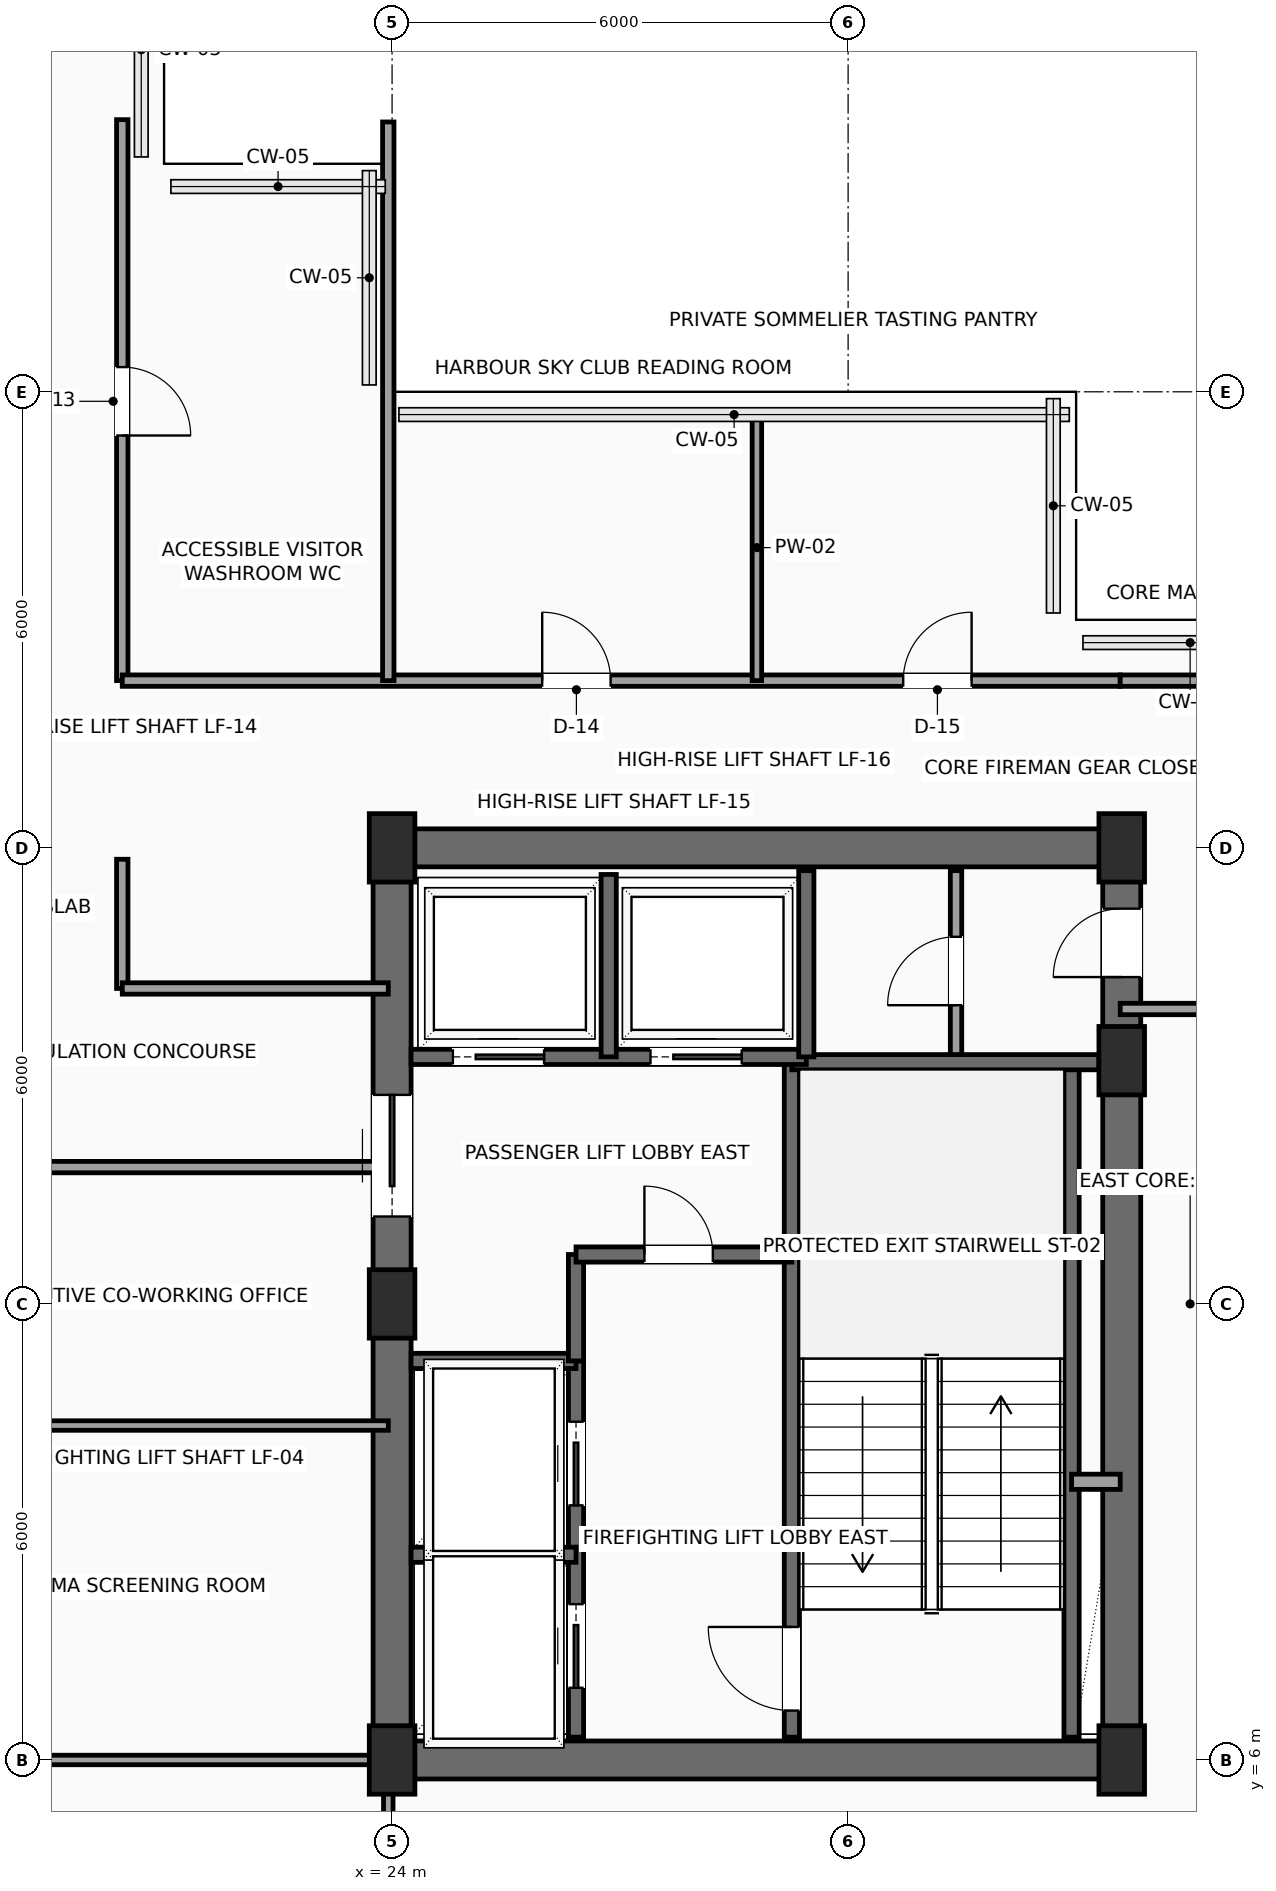
"""IFC4 building model, lengths in metres.
Left out: names, types, materials, properties, quantities, classifications, styles, units other than length and angle.
Written with IfcOpenShell. Run it as: python <this file> out.ifc"""

import sys

from ifc_helpers import new_model, si_unit, direction, frame, frame_2d, origin, origin_2d, place, context, subcontext, project, spatial, rectangle, extrude, element, fill, save


model = new_model("IFC4")
c1 = context("Model", 3, precision=1e-05, world=origin(), true_north=direction((0.0, 1.0)))
c2 = subcontext(c1, "Body", "Model", "MODEL_VIEW")
j1 = project(units=[si_unit("LENGTHUNIT", "METRE"), si_unit("PLANEANGLEUNIT", "RADIAN")], contexts=[c1])
p1 = place(None, origin())
s1 = spatial("IfcSite", under=j1, at=p1, CompositionType="ELEMENT")
p2 = place(p1, origin())
s2 = spatial("IfcBuilding", under=s1, at=p2, CompositionType="ELEMENT")
p3 = place(p2, frame((0.0, 0.0, 267.7)))
s3 = spatial("IfcBuildingStorey", under=s2, at=p3, CompositionType="ELEMENT", Elevation=267.7)
for number, where, z_axis, x_axis in (
    (1, (24.0, 6.0, 0.0), (0.0, 0.0, 1.0), (1.0, 0.0, 0.0)),
    (2, (24.0, 12.0, 0.0), (0.0, 0.0, 1.0), (1.0, 0.0, 0.0)),
    (3, (24.0, 18.0, 0.0), (0.0, 0.0, 1.0), (1.0, 0.0, 0.0)),
    (4, (33.6, 6.0, 0.0), (0.0, 0.0, 1.0), (1.0, 0.0, 0.0)),
    (5, (33.6, 15.2, 0.0), (0.0, 0.0, 1.0), (1.0, 0.0, 0.0)),
    (6, (33.6, 18.0, 0.0), (0.0, 0.0, 1.0), (1.0, 0.0, 0.0)),
):
    element("IfcColumn", number, at=place(p3, frame(where, z_axis=z_axis, x_axis=x_axis)), inside=s3, PredefinedType="COLUMN", context=c2, shape_type="SweptSolid", body=[
        extrude(rectangle(XDim=0.6, YDim=0.9, at=origin_2d()), origin(), (0.0, 0.0, 1.0), 3.5),
    ])
for number, where, z_axis, x_axis in (
    (7, (24.0, 6.0, 0.0), (0.0, 0.0, 1.0), (1.0, 0.0, 0.0)),
    (8, (24.0, 18.0, 0.0), (0.0, 0.0, 1.0), (1.0, 0.0, 0.0)),
):
    element("IfcWall", number, at=place(p3, frame(where, z_axis=z_axis, x_axis=x_axis)), inside=s3, PredefinedType="SHEAR", context=c2, shape_type="SweptSolid", body=[
        extrude(rectangle(XDim=9.6, YDim=0.5, at=frame_2d((4.8, 0.0))), origin(), (0.0, 0.0, 1.0), 3.3),
    ])
p4 = place(p3, frame((24.0, 6.0, 0.0), z_axis=(0.0, 0.0, 1.0), x_axis=(0.0, 1.0, 0.0)))
e9 = element("IfcWall", 9, at=p4, inside=s3, PredefinedType="SHEAR", context=c2, shape_type="SweptSolid", body=[
    extrude(rectangle(XDim=12.0, YDim=0.5, at=frame_2d((6.0, 0.0))), origin(), (0.0, 0.0, 1.0), 3.3),
])
p5 = place(p4, frame((7.15, 0.0, 0.0)))
e10 = element("IfcOpeningElement", 10, at=p5, cuts=e9, PredefinedType="OPENING", context=c2, shape_type="SweptSolid", body=[
    extrude(rectangle(XDim=1.6, YDim=2.3, at=frame_2d((0.8, 1.15))), frame((0.0, 0.26, 0.0), z_axis=(0.0, -1.0, 0.0), x_axis=(1.0, 0.0, 0.0)), (0.0, 0.0, 1.0), 0.52),
])
p6 = place(p3, frame((33.6, 6.0, 0.0), z_axis=(0.0, 0.0, 1.0), x_axis=(0.0, 1.0, 0.0)))
e11 = element("IfcWall", 11, at=p6, inside=s3, PredefinedType="SHEAR", context=c2, shape_type="SweptSolid", body=[
    extrude(rectangle(XDim=12.0, YDim=0.5, at=frame_2d((6.0, 0.0))), origin(), (0.0, 0.0, 1.0), 3.3),
])
p7 = place(p6, frame((10.3, 0.0, 0.0)))
e12 = element("IfcOpeningElement", 12, at=p7, cuts=e11, PredefinedType="OPENING", context=c2, shape_type="SweptSolid", body=[
    extrude(rectangle(XDim=0.9, YDim=2.15, at=frame_2d((0.45, 1.075))), frame((0.0, 0.26, 0.0), z_axis=(0.0, -1.0, 0.0), x_axis=(1.0, 0.0, 0.0)), (0.0, 0.0, 1.0), 0.52),
])
p8 = place(p3, frame((29.26, 6.3, 0.0), z_axis=(0.0, 0.0, 1.0), x_axis=(0.0, 1.0, 0.0)))
e13 = element("IfcWall", 13, at=p8, inside=s3, PredefinedType="SHEAR", context=c2, shape_type="SweptSolid", body=[
    extrude(rectangle(XDim=8.88, YDim=0.2, at=frame_2d((4.44, 0.0))), origin(), (0.0, 0.0, 1.0), 3.3),
])
p9 = place(p8, frame((0.35, 0.0, 0.0)))
e14 = element("IfcOpeningElement", 14, at=p9, cuts=e13, PredefinedType="OPENING", context=c2, shape_type="SweptSolid", body=[
    extrude(rectangle(XDim=1.1, YDim=2.2, at=frame_2d((0.55, 1.1))), frame((0.0, 0.11, 0.0), z_axis=(0.0, -1.0, 0.0), x_axis=(1.0, 0.0, 0.0)), (0.0, 0.0, 1.0), 0.22),
])
p10 = place(p3, frame((32.94, 6.3, 0.0), z_axis=(0.0, 0.0, 1.0), x_axis=(0.0, 1.0, 0.0)))
e15 = element("IfcWall", 15, at=p10, inside=s3, PredefinedType="SHEAR", context=c2, shape_type="SweptSolid", body=[
    extrude(rectangle(XDim=8.88, YDim=0.2, at=frame_2d((4.44, 0.0))), origin(), (0.0, 0.0, 1.0), 3.3),
])
p11 = place(p3, frame((29.26, 15.18, 0.0), z_axis=(0.0, 0.0, 1.0), x_axis=(1.0, 0.0, 0.0)))
e16 = element("IfcWall", 16, at=p11, inside=s3, PredefinedType="SHEAR", context=c2, shape_type="SweptSolid", body=[
    extrude(rectangle(XDim=4.04, YDim=0.2, at=frame_2d((2.02, 0.0))), origin(), (0.0, 0.0, 1.0), 3.3),
])
p12 = place(p3, frame((26.42, 6.3, 0.0), z_axis=(0.0, 0.0, 1.0), x_axis=(0.0, 1.0, 0.0)))
e17 = element("IfcWall", 17, at=p12, inside=s3, PredefinedType="SHEAR", context=c2, shape_type="SweptSolid", body=[
    extrude(rectangle(XDim=4.95, YDim=0.2, at=frame_2d((2.475, 0.0))), origin(), (0.0, 0.0, 1.0), 3.3),
])
p13 = place(p12, frame((0.65, 0.0, 0.0)))
e18 = element("IfcOpeningElement", 18, at=p13, cuts=e17, PredefinedType="OPENING", context=c2, shape_type="SweptSolid", body=[
    extrude(rectangle(XDim=1.1, YDim=2.2, at=frame_2d((0.55, 1.1))), frame((0.0, 0.11, 0.0), z_axis=(0.0, -1.0, 0.0), x_axis=(1.0, 0.0, 0.0)), (0.0, 0.0, 1.0), 0.22),
])
p14 = place(p12, frame((3.05, 0.0, 0.0)))
e19 = element("IfcOpeningElement", 19, at=p14, cuts=e17, PredefinedType="OPENING", context=c2, shape_type="SweptSolid", body=[
    extrude(rectangle(XDim=1.1, YDim=2.2, at=frame_2d((0.55, 1.1))), frame((0.0, 0.11, 0.0), z_axis=(0.0, -1.0, 0.0), x_axis=(1.0, 0.0, 0.0)), (0.0, 0.0, 1.0), 0.22),
])
for number, where, z_axis, x_axis in (
    (20, (24.25, 8.7, 0.0), (0.0, 0.0, 1.0), (1.0, 0.0, 0.0)),
    (21, (24.25, 11.25, 0.0), (0.0, 0.0, 1.0), (1.0, 0.0, 0.0)),
):
    element("IfcWall", number, at=place(p3, frame(where, z_axis=z_axis, x_axis=x_axis)), inside=s3, PredefinedType="SHEAR", context=c2, shape_type="SweptSolid", body=[
        extrude(rectangle(XDim=2.17, YDim=0.2, at=frame_2d((1.085, 0.0))), origin(), (0.0, 0.0, 1.0), 3.3),
    ])
p15 = place(p3, frame((26.42, 11.25, 0.0), z_axis=(0.0, 0.0, 1.0), x_axis=(0.0, 1.0, 0.0)))
e22 = element("IfcWall", 22, at=p15, inside=s3, PredefinedType="SHEAR", context=c2, shape_type="SweptSolid", body=[
    extrude(rectangle(XDim=1.4, YDim=0.2, at=frame_2d((0.7, 0.0))), origin(), (0.0, 0.0, 1.0), 3.3),
])
p16 = place(p3, frame((26.42, 12.65, 0.0), z_axis=(0.0, 0.0, 1.0), x_axis=(1.0, 0.0, 0.0)))
e23 = element("IfcWall", 23, at=p16, inside=s3, PredefinedType="SHEAR", context=c2, shape_type="SweptSolid", body=[
    extrude(rectangle(XDim=2.84, YDim=0.2, at=frame_2d((1.42, 0.0))), origin(), (0.0, 0.0, 1.0), 3.3),
])
p17 = place(p16, frame((0.9, 0.0, 0.0)))
e24 = element("IfcOpeningElement", 24, at=p17, cuts=e23, PredefinedType="OPENING", context=c2, shape_type="SweptSolid", body=[
    extrude(rectangle(XDim=0.9, YDim=2.15, at=frame_2d((0.45, 1.075))), frame((0.0, 0.11, 0.0), z_axis=(0.0, -1.0, 0.0), x_axis=(1.0, 0.0, 0.0)), (0.0, 0.0, 1.0), 0.22),
])
p18 = place(p3, frame((32.94, 9.66, 0.0), z_axis=(0.0, 0.0, 1.0), x_axis=(1.0, 0.0, 0.0)))
e25 = element("IfcWall", 25, at=p18, inside=s3, PredefinedType="SOLIDWALL", context=c2, shape_type="SweptSolid", body=[
    extrude(rectangle(XDim=0.64, YDim=0.2, at=frame_2d((0.32, 0.0))), origin(), (0.0, 0.0, 1.0), 3.3),
])
p19 = place(p3, frame((24.25, 15.25, 0.0), z_axis=(0.0, 0.0, 1.0), x_axis=(1.0, 0.0, 0.0)))
e26 = element("IfcWall", 26, at=p19, inside=s3, PredefinedType="SHEAR", context=c2, shape_type="SweptSolid", body=[
    extrude(rectangle(XDim=5.2, YDim=0.2, at=frame_2d((2.6, 0.0))), origin(), (0.0, 0.0, 1.0), 3.3),
])
p20 = place(p19, frame((0.55, 0.0, 0.0)))
e27 = element("IfcOpeningElement", 27, at=p20, cuts=e26, PredefinedType="OPENING", context=c2, shape_type="SweptSolid", body=[
    extrude(rectangle(XDim=1.2, YDim=2.2, at=frame_2d((0.6, 1.1))), frame((0.0, 0.11, 0.0), z_axis=(0.0, -1.0, 0.0), x_axis=(1.0, 0.0, 0.0)), (0.0, 0.0, 1.0), 0.22),
])
p21 = place(p19, frame((3.15, 0.0, 0.0)))
e28 = element("IfcOpeningElement", 28, at=p21, cuts=e26, PredefinedType="OPENING", context=c2, shape_type="SweptSolid", body=[
    extrude(rectangle(XDim=1.2, YDim=2.2, at=frame_2d((0.6, 1.1))), frame((0.0, 0.11, 0.0), z_axis=(0.0, -1.0, 0.0), x_axis=(1.0, 0.0, 0.0)), (0.0, 0.0, 1.0), 0.22),
])
p22 = place(p3, frame((26.85, 15.25, 0.0), z_axis=(0.0, 0.0, 1.0), x_axis=(0.0, 1.0, 0.0)))
e29 = element("IfcWall", 29, at=p22, inside=s3, PredefinedType="SHEAR", context=c2, shape_type="SweptSolid", body=[
    extrude(rectangle(XDim=2.4, YDim=0.2, at=frame_2d((1.2, 0.0))), origin(), (0.0, 0.0, 1.0), 3.3),
])
p23 = place(p3, frame((29.45, 15.25, 0.0), z_axis=(0.0, 0.0, 1.0), x_axis=(0.0, 1.0, 0.0)))
e30 = element("IfcWall", 30, at=p23, inside=s3, PredefinedType="SHEAR", context=c2, shape_type="SweptSolid", body=[
    extrude(rectangle(XDim=2.45, YDim=0.2, at=frame_2d((1.225, 0.0))), origin(), (0.0, 0.0, 1.0), 3.3),
])
p24 = place(p3, frame((31.42, 15.28, 0.0), z_axis=(0.0, 0.0, 1.0), x_axis=(0.0, 1.0, 0.0)))
e31 = element("IfcWall", 31, at=p24, inside=s3, PredefinedType="PARTITIONING", context=c2, shape_type="SweptSolid", body=[
    extrude(rectangle(XDim=2.42, YDim=0.15, at=frame_2d((1.21, 0.0))), origin(), (0.0, 0.0, 1.0), 3.3),
])
p25 = place(p24, frame((0.65, 0.0, 0.0)))
e32 = element("IfcOpeningElement", 32, at=p25, cuts=e31, PredefinedType="OPENING", context=c2, shape_type="SweptSolid", body=[
    extrude(rectangle(XDim=0.9, YDim=2.15, at=frame_2d((0.45, 1.075))), frame((0.0, 0.085, 0.0), z_axis=(0.0, -1.0, 0.0), x_axis=(1.0, 0.0, 0.0)), (0.0, 0.0, 1.0), 0.17),
])
p26 = place(p3, frame((20.45, 27.58, 0.0), z_axis=(0.0, 0.0, 1.0), x_axis=(0.0, -1.0, 0.0)))
e33 = element("IfcWall", 33, at=p26, inside=s3, PredefinedType="PARTITIONING", context=c2, shape_type="SweptSolid", body=[
    extrude(rectangle(XDim=7.38, YDim=0.15, at=frame_2d((3.69, 0.0))), origin(), (0.0, 0.0, 1.0), 3.3),
])
p27 = place(p26, frame((3.255, 0.0, 0.0)))
e34 = element("IfcOpeningElement", 34, at=p27, cuts=e33, PredefinedType="OPENING", context=c2, shape_type="SweptSolid", body=[
    extrude(rectangle(XDim=0.9, YDim=2.1, at=frame_2d((0.45, 1.05))), frame((0.0, 0.085, 0.0), z_axis=(0.0, -1.0, 0.0), x_axis=(1.0, 0.0, 0.0)), (0.0, 0.0, 1.0), 0.17),
])
p28 = place(p3, frame((20.45, 20.2, 0.0), z_axis=(0.0, 0.0, 1.0), x_axis=(1.0, 0.0, 0.0)))
e35 = element("IfcWall", 35, at=p28, inside=s3, PredefinedType="PARTITIONING", context=c2, shape_type="SweptSolid", body=[
    extrude(rectangle(XDim=13.13, YDim=0.15, at=frame_2d((6.565, 0.0))), origin(), (0.0, 0.0, 1.0), 3.3),
])
p29 = place(p28, frame((5.525, 0.0, 0.0)))
e36 = element("IfcOpeningElement", 36, at=p29, cuts=e35, PredefinedType="OPENING", context=c2, shape_type="SweptSolid", body=[
    extrude(rectangle(XDim=0.9, YDim=2.1, at=frame_2d((0.45, 1.05))), frame((0.0, 0.085, 0.0), z_axis=(0.0, -1.0, 0.0), x_axis=(1.0, 0.0, 0.0)), (0.0, 0.0, 1.0), 0.17),
])
p30 = place(p28, frame((10.275, 0.0, 0.0)))
e37 = element("IfcOpeningElement", 37, at=p30, cuts=e35, PredefinedType="OPENING", context=c2, shape_type="SweptSolid", body=[
    extrude(rectangle(XDim=0.9, YDim=2.1, at=frame_2d((0.45, 1.05))), frame((0.0, 0.085, 0.0), z_axis=(0.0, -1.0, 0.0), x_axis=(1.0, 0.0, 0.0)), (0.0, 0.0, 1.0), 0.17),
])
for number, where, z_axis, x_axis in (
    (38, (33.58, 20.2, 0.0), (0.0, 0.0, 1.0), (1.0, 0.0, 0.0)),
    (39, (35.7, 15.88, 0.0), (0.0, 0.0, 1.0), (-1.0, 0.0, 0.0)),
):
    element("IfcWall", number, at=place(p3, frame(where, z_axis=z_axis, x_axis=x_axis)), inside=s3, PredefinedType="PARTITIONING", context=c2, shape_type="SweptSolid", body=[
        extrude(rectangle(XDim=2.12, YDim=0.15, at=frame_2d((1.06, 0.0))), origin(), (0.0, 0.0, 1.0), 3.3),
    ])
p31 = place(p3, frame((20.45, 17.85, 0.0), z_axis=(0.0, 0.0, 1.0), x_axis=(0.0, -1.0, 0.0)))
e40 = element("IfcWall", 40, at=p31, inside=s3, PredefinedType="PARTITIONING", context=c2, shape_type="SweptSolid", body=[
    extrude(rectangle(XDim=1.7, YDim=0.15, at=frame_2d((0.85, 0.0))), origin(), (0.0, 0.0, 1.0), 3.3),
])
p32 = place(p3, frame((20.45, 16.15, 0.0), z_axis=(0.0, 0.0, 1.0), x_axis=(1.0, 0.0, 0.0)))
e41 = element("IfcWall", 41, at=p32, inside=s3, PredefinedType="PARTITIONING", context=c2, shape_type="SweptSolid", body=[
    extrude(rectangle(XDim=3.5, YDim=0.15, at=frame_2d((1.75, 0.0))), origin(), (0.0, 0.0, 1.0), 3.3),
])
p33 = place(p3, frame((23.95, 13.8, 0.0), z_axis=(0.0, 0.0, 1.0), x_axis=(-1.0, 0.0, 0.0)))
e42 = element("IfcWall", 42, at=p33, inside=s3, PredefinedType="PARTITIONING", context=c2, shape_type="SweptSolid", body=[
    extrude(rectangle(XDim=9.0, YDim=0.15, at=frame_2d((4.5, 0.0))), origin(), (0.0, 0.0, 1.0), 3.3),
])
p34 = place(p3, frame((23.95, 20.2, 0.0), z_axis=(0.0, 0.0, 1.0), x_axis=(0.0, 1.0, 0.0)))
e43 = element("IfcWall", 43, at=p34, inside=s3, PredefinedType="PARTITIONING", context=c2, shape_type="SweptSolid", body=[
    extrude(rectangle(XDim=7.35, YDim=0.15, at=frame_2d((3.675, 0.0))), origin(), (0.0, 0.0, 1.0), 3.3),
])
p35 = place(p3, frame((28.8, 20.2, 0.0), z_axis=(0.0, 0.0, 1.0), x_axis=(0.0, 1.0, 0.0)))
e44 = element("IfcWall", 44, at=p35, inside=s3, PredefinedType="PARTITIONING", context=c2, shape_type="SweptSolid", body=[
    extrude(rectangle(XDim=3.5, YDim=0.125, at=frame_2d((1.75, 0.0))), origin(), (0.0, 0.0, 1.0), 3.3),
])
p36 = place(p3, frame((14.95, 6.0, 0.0), z_axis=(0.0, 0.0, 1.0), x_axis=(1.0, 0.0, 0.0)))
e45 = element("IfcWall", 45, at=p36, inside=s3, PredefinedType="PARTITIONING", context=c2, shape_type="SweptSolid", body=[
    extrude(rectangle(XDim=9.0, YDim=0.125, at=frame_2d((4.5, 0.0))), origin(), (0.0, 0.0, 1.0), 2.992),
])
p37 = place(p3, frame((23.95, 0.3, 0.0), z_axis=(0.0, 0.0, 1.0), x_axis=(0.0, 1.0, 0.0)))
e46 = element("IfcWall", 46, at=p37, inside=s3, PredefinedType="PARTITIONING", context=c2, shape_type="SweptSolid", body=[
    extrude(rectangle(XDim=5.7, YDim=0.125, at=frame_2d((2.85, 0.0))), origin(), (0.0, 0.0, 1.0), 2.967),
])
p38 = place(p3, frame((14.95, 10.4, 0.0), z_axis=(0.0, 0.0, 1.0), x_axis=(1.0, 0.0, 0.0)))
e47 = element("IfcWall", 47, at=p38, inside=s3, PredefinedType="PARTITIONING", context=c2, shape_type="SweptSolid", body=[
    extrude(rectangle(XDim=9.0, YDim=0.125, at=frame_2d((4.5, 0.0))), origin(), (0.0, 0.0, 1.0), 3.3),
])
p39 = place(p5, origin())
e48 = element("IfcDoor", 48, at=p39, inside=s3, OperationType="DOUBLE_DOOR_SLIDING", PredefinedType="DOOR", context=c2, shape_type="SweptSolid", body=[
    extrude(rectangle(XDim=1.6, YDim=2.3, at=frame_2d((0.8, 1.15))), frame((0.0, 0.025, 0.0), z_axis=(0.0, -1.0, 0.0), x_axis=(1.0, 0.0, 0.0)), (0.0, 0.0, 1.0), 0.05),
])
fill(e10, e48)
p40 = place(p7, origin())
e49 = element("IfcDoor", 49, at=p40, inside=s3, OperationType="SINGLE_SWING_LEFT", PredefinedType="DOOR", context=c2, shape_type="SweptSolid", body=[
    extrude(rectangle(XDim=0.9, YDim=2.15, at=frame_2d((0.45, 1.075))), frame((0.0, 0.025, 0.0), z_axis=(0.0, -1.0, 0.0), x_axis=(1.0, 0.0, 0.0)), (0.0, 0.0, 1.0), 0.05),
])
fill(e12, e49)
p41 = place(p9, origin())
e50 = element("IfcDoor", 50, at=p41, inside=s3, OperationType="SINGLE_SWING_RIGHT", PredefinedType="DOOR", context=c2, shape_type="SweptSolid", body=[
    extrude(rectangle(XDim=1.1, YDim=2.2, at=frame_2d((0.55, 1.1))), frame((0.0, 0.025, 0.0), z_axis=(0.0, -1.0, 0.0), x_axis=(1.0, 0.0, 0.0)), (0.0, 0.0, 1.0), 0.05),
])
fill(e14, e50)
p42 = place(p13, origin())
e51 = element("IfcDoor", 51, at=p42, inside=s3, OperationType="SLIDING_TO_LEFT", PredefinedType="DOOR", context=c2, shape_type="SweptSolid", body=[
    extrude(rectangle(XDim=1.1, YDim=2.2, at=frame_2d((0.55, 1.1))), frame((0.0, 0.025, 0.0), z_axis=(0.0, -1.0, 0.0), x_axis=(1.0, 0.0, 0.0)), (0.0, 0.0, 1.0), 0.05),
])
fill(e18, e51)
p43 = place(p14, origin())
e52 = element("IfcDoor", 52, at=p43, inside=s3, OperationType="SLIDING_TO_LEFT", PredefinedType="DOOR", context=c2, shape_type="SweptSolid", body=[
    extrude(rectangle(XDim=1.1, YDim=2.2, at=frame_2d((0.55, 1.1))), frame((0.0, 0.025, 0.0), z_axis=(0.0, -1.0, 0.0), x_axis=(1.0, 0.0, 0.0)), (0.0, 0.0, 1.0), 0.05),
])
fill(e19, e52)
p44 = place(p17, origin())
e53 = element("IfcDoor", 53, at=p44, inside=s3, OperationType="SINGLE_SWING_LEFT", PredefinedType="DOOR", context=c2, shape_type="SweptSolid", body=[
    extrude(rectangle(XDim=0.9, YDim=2.15, at=frame_2d((0.45, 1.075))), frame((0.0, 0.025, 0.0), z_axis=(0.0, -1.0, 0.0), x_axis=(1.0, 0.0, 0.0)), (0.0, 0.0, 1.0), 0.05),
])
fill(e24, e53)
p45 = place(p20, origin())
e54 = element("IfcDoor", 54, at=p45, inside=s3, OperationType="SLIDING_TO_RIGHT", PredefinedType="DOOR", context=c2, shape_type="SweptSolid", body=[
    extrude(rectangle(XDim=1.2, YDim=2.2, at=frame_2d((0.6, 1.1))), frame((0.0, 0.025, 0.0), z_axis=(0.0, -1.0, 0.0), x_axis=(1.0, 0.0, 0.0)), (0.0, 0.0, 1.0), 0.05),
])
fill(e27, e54)
p46 = place(p21, origin())
e55 = element("IfcDoor", 55, at=p46, inside=s3, OperationType="SLIDING_TO_RIGHT", PredefinedType="DOOR", context=c2, shape_type="SweptSolid", body=[
    extrude(rectangle(XDim=1.2, YDim=2.2, at=frame_2d((0.6, 1.1))), frame((0.0, 0.025, 0.0), z_axis=(0.0, -1.0, 0.0), x_axis=(1.0, 0.0, 0.0)), (0.0, 0.0, 1.0), 0.05),
])
fill(e28, e55)
p47 = place(p25, origin())
e56 = element("IfcDoor", 56, at=p47, inside=s3, OperationType="SINGLE_SWING_LEFT", PredefinedType="DOOR", context=c2, shape_type="SweptSolid", body=[
    extrude(rectangle(XDim=0.9, YDim=2.15, at=frame_2d((0.45, 1.075))), frame((0.0, 0.025, 0.0), z_axis=(0.0, -1.0, 0.0), x_axis=(1.0, 0.0, 0.0)), (0.0, 0.0, 1.0), 0.05),
])
fill(e32, e56)
p48 = place(p27, origin())
e57 = element("IfcDoor", 57, at=p48, inside=s3, OperationType="SINGLE_SWING_RIGHT", PredefinedType="DOOR", context=c2, shape_type="SweptSolid", body=[
    extrude(rectangle(XDim=0.9, YDim=2.1, at=frame_2d((0.45, 1.05))), frame((0.0, 0.025, 0.0), z_axis=(0.0, -1.0, 0.0), x_axis=(1.0, 0.0, 0.0)), (0.0, 0.0, 1.0), 0.05),
])
fill(e34, e57)
p49 = place(p29, origin())
e58 = element("IfcDoor", 58, at=p49, inside=s3, OperationType="SINGLE_SWING_LEFT", PredefinedType="DOOR", context=c2, shape_type="SweptSolid", body=[
    extrude(rectangle(XDim=0.9, YDim=2.1, at=frame_2d((0.45, 1.05))), frame((0.0, 0.025, 0.0), z_axis=(0.0, -1.0, 0.0), x_axis=(1.0, 0.0, 0.0)), (0.0, 0.0, 1.0), 0.05),
])
fill(e36, e58)
p50 = place(p30, origin())
e59 = element("IfcDoor", 59, at=p50, inside=s3, OperationType="SINGLE_SWING_RIGHT", PredefinedType="DOOR", context=c2, shape_type="SweptSolid", body=[
    extrude(rectangle(XDim=0.9, YDim=2.1, at=frame_2d((0.45, 1.05))), frame((0.0, 0.025, 0.0), z_axis=(0.0, -1.0, 0.0), x_axis=(1.0, 0.0, 0.0)), (0.0, 0.0, 1.0), 0.05),
])
fill(e37, e59)
save(model, sys.argv[1])
